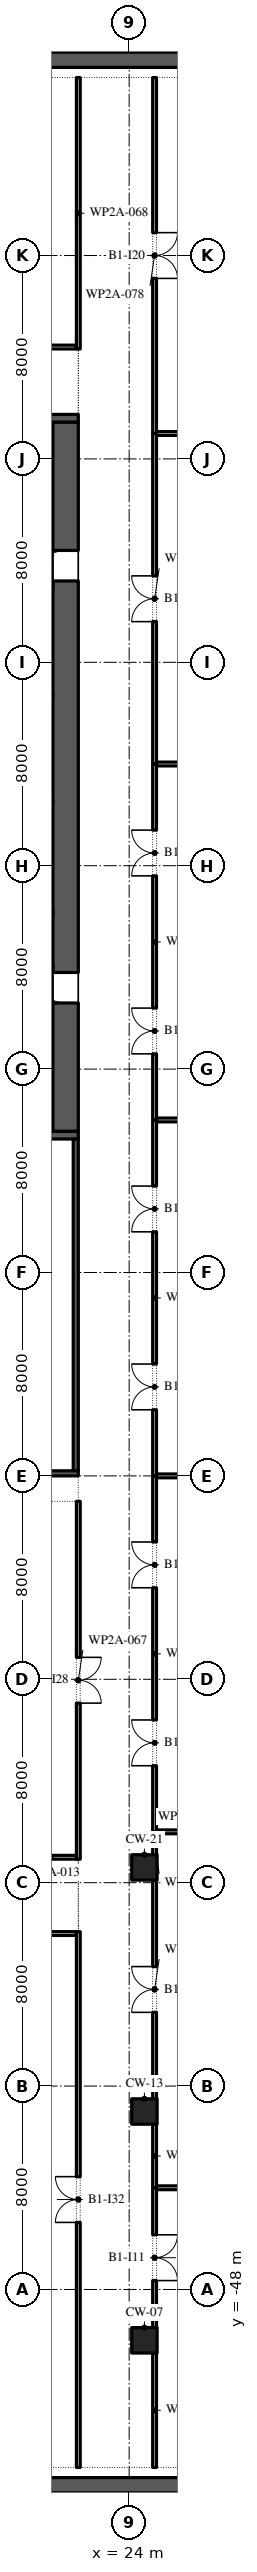
"""IFC4 building model, lengths in metres.
Left out: names, types, materials, properties, quantities, classifications, styles, units other than length and angle.
Written with IfcOpenShell. Run it as: python <this file> out.ifc"""

import sys

from ifc_helpers import new_model, si_unit, direction, frame, frame_2d, origin, origin_2d, place, context, subcontext, project, spatial, rectangle, extrude, element, fill, save


model = new_model("IFC4")
c1 = context("Model", 3, precision=1e-05, world=origin(), true_north=direction((0.0, 1.0)))
c2 = subcontext(c1, "Body", "Model", "MODEL_VIEW")
j1 = project(units=[si_unit("LENGTHUNIT", "METRE"), si_unit("PLANEANGLEUNIT", "RADIAN")], contexts=[c1])
p1 = place(None, origin())
s1 = spatial("IfcSite", under=j1, at=p1, CompositionType="ELEMENT")
p2 = place(p1, origin())
s2 = spatial("IfcBuilding", under=s1, at=p2, CompositionType="ELEMENT")
p3 = place(p2, frame((0.0, 0.0, -5.2)))
s3 = spatial("IfcBuildingStorey", under=s2, at=p3, CompositionType="ELEMENT", Elevation=-5.2)
for number, where, z_axis, x_axis in (
    (1, (-48.0, -55.7, 0.0), (0.0, 0.0, 1.0), (1.0, 0.0, 0.0)),
    (2, (-48.0, 39.7, 0.0), (0.0, 0.0, 1.0), (1.0, 0.0, 0.0)),
):
    element("IfcWall", number, at=place(p3, frame(where, z_axis=z_axis, x_axis=x_axis)), inside=s3, PredefinedType="SOLIDWALL", context=c2, shape_type="SweptSolid", body=[
        extrude(rectangle(XDim=96.0, YDim=0.6, at=frame_2d((48.0, 0.0))), origin(), (0.0, 0.0, 1.0), 4.8),
    ])
for number, where, z_axis, x_axis in (
    (3, (24.6, -50.0, 0.0), (0.0, 0.0, 1.0), (1.0, 0.0, 0.0)),
    (4, (24.6, -41.0, 0.0), (0.0, 0.0, 1.0), (1.0, 0.0, 0.0)),
    (5, (24.6, -31.4, 0.0), (0.0, 0.0, 1.0), (1.0, 0.0, 0.0)),
):
    element("IfcColumn", number, at=place(p3, frame(where, z_axis=z_axis, x_axis=x_axis)), inside=s3, PredefinedType="COLUMN", context=c2, shape_type="SweptSolid", body=[
        extrude(rectangle(XDim=1.0, YDim=1.0, at=origin_2d()), origin(), (0.0, 0.0, 1.0), 5.2),
    ])
p4 = place(p3, frame((21.5, -2.45, 0.0), z_axis=(0.0, 0.0, 1.0), x_axis=(0.0, 1.0, 0.0)))
e6 = element("IfcWall", 6, at=p4, inside=s3, PredefinedType="SHEAR", context=c2, shape_type="SweptSolid", body=[
    extrude(rectangle(XDim=27.9, YDim=1.0, at=frame_2d((13.95, 0.0))), origin(), (0.0, 0.0, 1.0), 4.9),
])
p5 = place(p4, frame((5.05, 0.0, 0.0)))
e7 = element("IfcOpeningElement", 7, at=p5, cuts=e6, PredefinedType="OPENING", context=c2, shape_type="SweptSolid", body=[
    extrude(rectangle(XDim=1.2, YDim=2.1, at=frame_2d((0.6, 1.05))), frame((0.0, 0.51, 0.0), z_axis=(0.0, -1.0, 0.0), x_axis=(1.0, 0.0, 0.0)), (0.0, 0.0, 1.0), 1.02),
])
p6 = place(p4, frame((21.65, 0.0, 0.0)))
e8 = element("IfcOpeningElement", 8, at=p6, cuts=e6, PredefinedType="OPENING", context=c2, shape_type="SweptSolid", body=[
    extrude(rectangle(XDim=1.2, YDim=2.1, at=frame_2d((0.6, 1.05))), frame((0.0, 0.51, 0.0), z_axis=(0.0, -1.0, 0.0), x_axis=(1.0, 0.0, 0.0)), (0.0, 0.0, 1.0), 1.02),
])
for number, where, z_axis, x_axis in (
    (9, (10.0, -2.6, 0.0), (0.0, 0.0, 1.0), (1.0, 0.0, 0.0)),
    (10, (10.0, 25.6, 0.0), (0.0, 0.0, 1.0), (1.0, 0.0, 0.0)),
):
    element("IfcWall", number, at=place(p3, frame(where, z_axis=z_axis, x_axis=x_axis)), inside=s3, PredefinedType="SHEAR", context=c2, shape_type="SweptSolid", body=[
        extrude(rectangle(XDim=12.0, YDim=0.3, at=frame_2d((6.0, 0.0))), origin(), (0.0, 0.0, 1.0), 4.9),
    ])
for number, where, z_axis, x_axis in (
    (11, (17.3, 4.0, 0.0), (0.0, 0.0, 1.0), (1.0, 0.0, 0.0)),
    (12, (17.3, 19.0, 0.0), (0.0, 0.0, 1.0), (1.0, 0.0, 0.0)),
):
    element("IfcWall", number, at=place(p3, frame(where, z_axis=z_axis, x_axis=x_axis)), inside=s3, PredefinedType="SHEAR", context=c2, shape_type="SweptSolid", body=[
        extrude(rectangle(XDim=3.7, YDim=0.3, at=frame_2d((1.85, 0.0))), origin(), (0.0, 0.0, 1.0), 4.9),
    ])
p7 = place(p3, frame((21.9, -15.8, 0.0), z_axis=(0.0, 0.0, 1.0), x_axis=(0.0, 1.0, 0.0)))
e13 = element("IfcWall", 13, at=p7, inside=s3, PredefinedType="SHEAR", context=c2, shape_type="SweptSolid", body=[
    extrude(rectangle(XDim=13.05, YDim=0.2, at=frame_2d((6.525, 0.0))), origin(), (0.0, 0.0, 1.0), 4.9),
])
p8 = place(p3, frame((10.0, -15.9, 0.0), z_axis=(0.0, 0.0, 1.0), x_axis=(1.0, 0.0, 0.0)))
e14 = element("IfcWall", 14, at=p8, inside=s3, PredefinedType="SHEAR", context=c2, shape_type="SweptSolid", body=[
    extrude(rectangle(XDim=12.0, YDim=0.2, at=frame_2d((6.0, 0.0))), origin(), (0.0, 0.0, 1.0), 4.9),
])
p9 = place(p3, frame((25.075, -44.0, 0.0), z_axis=(0.0, 0.0, 1.0), x_axis=(1.0, 0.0, 0.0)))
e15 = element("IfcWall", 15, at=p9, inside=s3, PredefinedType="PARTITIONING", context=c2, shape_type="SweptSolid", body=[
    extrude(rectangle(XDim=9.925, YDim=0.15, at=frame_2d((4.962, 0.0))), origin(), (0.0, 0.0, 1.0), 4.9),
])
p10 = place(p3, frame((11.0, -34.0, 0.0), z_axis=(0.0, 0.0, 1.0), x_axis=(1.0, 0.0, 0.0)))
e16 = element("IfcWall", 16, at=p10, inside=s3, PredefinedType="PARTITIONING", context=c2, shape_type="SweptSolid", body=[
    extrude(rectangle(XDim=10.925, YDim=0.15, at=frame_2d((5.462, 0.0))), origin(), (0.0, 0.0, 1.0), 4.9),
])
p11 = place(p3, frame((19.9, -31.0, 0.0), z_axis=(0.0, 0.0, 1.0), x_axis=(1.0, 0.0, 0.0)))
e17 = element("IfcWall", 17, at=p11, inside=s3, PredefinedType="PARTITIONING", context=c2, shape_type="SweptSolid", body=[
    extrude(rectangle(XDim=2.025, YDim=0.15, at=frame_2d((1.013, 0.0))), origin(), (0.0, 0.0, 1.0), 4.9),
])
p12 = place(p3, frame((25.075, -30.0, 0.0), z_axis=(0.0, 0.0, 1.0), x_axis=(1.0, 0.0, 0.0)))
e18 = element("IfcWall", 18, at=p12, inside=s3, PredefinedType="PARTITIONING", context=c2, shape_type="SweptSolid", body=[
    extrude(rectangle(XDim=3.025, YDim=0.15, at=frame_2d((1.513, 0.0))), origin(), (0.0, 0.0, 1.0), 4.9),
])
p13 = place(p3, frame((25.075, -16.0, 0.0), z_axis=(0.0, 0.0, 1.0), x_axis=(1.0, 0.0, 0.0)))
e19 = element("IfcWall", 19, at=p13, inside=s3, PredefinedType="PARTITIONING", context=c2, shape_type="SweptSolid", body=[
    extrude(rectangle(XDim=16.425, YDim=0.15, at=frame_2d((8.212, 0.0))), origin(), (0.0, 0.0, 1.0), 4.9),
])
p14 = place(p3, frame((25.075, -2.0, 0.0), z_axis=(0.0, 0.0, 1.0), x_axis=(1.0, 0.0, 0.0)))
e20 = element("IfcWall", 20, at=p14, inside=s3, PredefinedType="PARTITIONING", context=c2, shape_type="SweptSolid", body=[
    extrude(rectangle(XDim=21.925, YDim=0.15, at=frame_2d((10.962, 0.0))), origin(), (0.0, 0.0, 1.0), 4.9),
])
p15 = place(p3, frame((25.075, 12.0, 0.0), z_axis=(0.0, 0.0, 1.0), x_axis=(1.0, 0.0, 0.0)))
e21 = element("IfcWall", 21, at=p15, inside=s3, PredefinedType="PARTITIONING", context=c2, shape_type="SweptSolid", body=[
    extrude(rectangle(XDim=6.625, YDim=0.15, at=frame_2d((3.312, 0.0))), origin(), (0.0, 0.0, 1.0), 4.9),
])
p16 = place(p3, frame((25.075, 25.0, 0.0), z_axis=(0.0, 0.0, 1.0), x_axis=(1.0, 0.0, 0.0)))
e22 = element("IfcWall", 22, at=p16, inside=s3, PredefinedType="PARTITIONING", context=c2, shape_type="SweptSolid", body=[
    extrude(rectangle(XDim=21.925, YDim=0.15, at=frame_2d((10.962, 0.0))), origin(), (0.0, 0.0, 1.0), 4.9),
])
p17 = place(p3, frame((0.0, 28.4, 0.0), z_axis=(0.0, 0.0, 1.0), x_axis=(1.0, 0.0, 0.0)))
e23 = element("IfcWall", 23, at=p17, inside=s3, PredefinedType="PARTITIONING", context=c2, shape_type="SweptSolid", body=[
    extrude(rectangle(XDim=21.925, YDim=0.15, at=frame_2d((10.962, 0.0))), origin(), (0.0, 0.0, 1.0), 4.9),
])
p18 = place(p17, frame((10.062, 0.0, 0.0)))
e24 = element("IfcOpeningElement", 24, at=p18, cuts=e23, PredefinedType="OPENING", context=c2, shape_type="SweptSolid", body=[
    extrude(rectangle(XDim=1.8, YDim=2.1, at=frame_2d((0.9, 1.05))), frame((0.0, 0.085, 0.0), z_axis=(0.0, -1.0, 0.0), x_axis=(1.0, 0.0, 0.0)), (0.0, 0.0, 1.0), 0.17),
])
p19 = place(p3, frame((22.0, -55.0, 0.0), z_axis=(0.0, 0.0, 1.0), x_axis=(0.0, 1.0, 0.0)))
e25 = element("IfcWall", 25, at=p19, inside=s3, PredefinedType="PARTITIONING", context=c2, shape_type="SweptSolid", body=[
    extrude(rectangle(XDim=21.075, YDim=0.15, at=frame_2d((10.538, 0.0))), origin(), (0.0, 0.0, 1.0), 4.9),
])
p20 = place(p19, frame((9.637, 0.0, 0.0)))
e26 = element("IfcOpeningElement", 26, at=p20, cuts=e25, PredefinedType="OPENING", context=c2, shape_type="SweptSolid", body=[
    extrude(rectangle(XDim=1.8, YDim=2.1, at=frame_2d((0.9, 1.05))), frame((0.0, 0.085, 0.0), z_axis=(0.0, -1.0, 0.0), x_axis=(1.0, 0.0, 0.0)), (0.0, 0.0, 1.0), 0.17),
])
p21 = place(p3, frame((22.0, -31.075, 0.0), z_axis=(0.0, 0.0, 1.0), x_axis=(0.0, 1.0, 0.0)))
e27 = element("IfcWall", 27, at=p21, inside=s3, PredefinedType="PARTITIONING", context=c2, shape_type="SweptSolid", body=[
    extrude(rectangle(XDim=14.075, YDim=0.15, at=frame_2d((7.038, 0.0))), origin(), (0.0, 0.0, 1.0), 4.9),
])
p22 = place(p21, frame((6.137, 0.0, 0.0)))
e28 = element("IfcOpeningElement", 28, at=p22, cuts=e27, PredefinedType="OPENING", context=c2, shape_type="SweptSolid", body=[
    extrude(rectangle(XDim=1.8, YDim=2.1, at=frame_2d((0.9, 1.05))), frame((0.0, 0.085, 0.0), z_axis=(0.0, -1.0, 0.0), x_axis=(1.0, 0.0, 0.0)), (0.0, 0.0, 1.0), 0.17),
])
p23 = place(p3, frame((22.0, 28.325, 0.0), z_axis=(0.0, 0.0, 1.0), x_axis=(0.0, 1.0, 0.0)))
e29 = element("IfcWall", 29, at=p23, inside=s3, PredefinedType="PARTITIONING", context=c2, shape_type="SweptSolid", body=[
    extrude(rectangle(XDim=10.675, YDim=0.15, at=frame_2d((5.337, 0.0))), origin(), (0.0, 0.0, 1.0), 4.9),
])
p24 = place(p3, frame((25.0, -55.0, 0.0), z_axis=(0.0, 0.0, 1.0), x_axis=(0.0, 1.0, 0.0)))
e30 = element("IfcWall", 30, at=p24, inside=s3, PredefinedType="PARTITIONING", context=c2, shape_type="SweptSolid", body=[
    extrude(rectangle(XDim=4.5, YDim=0.15, at=frame_2d((2.25, 0.0))), origin(), (0.0, 0.0, 1.0), 4.9),
])
p25 = place(p3, frame((25.0, -49.5, 0.0), z_axis=(0.0, 0.0, 1.0), x_axis=(0.0, 1.0, 0.0)))
e31 = element("IfcWall", 31, at=p25, inside=s3, PredefinedType="PARTITIONING", context=c2, shape_type="SweptSolid", body=[
    extrude(rectangle(XDim=5.5, YDim=0.15, at=frame_2d((2.75, 0.0))), origin(), (0.0, 0.0, 1.0), 4.9),
])
p26 = place(p25, frame((1.85, 0.0, 0.0)))
e32 = element("IfcOpeningElement", 32, at=p26, cuts=e31, PredefinedType="OPENING", context=c2, shape_type="SweptSolid", body=[
    extrude(rectangle(XDim=1.8, YDim=2.1, at=frame_2d((0.9, 1.05))), frame((0.0, 0.085, 0.0), z_axis=(0.0, -1.0, 0.0), x_axis=(1.0, 0.0, 0.0)), (0.0, 0.0, 1.0), 0.17),
])
p27 = place(p3, frame((25.0, -44.0, 0.0), z_axis=(0.0, 0.0, 1.0), x_axis=(0.0, 1.0, 0.0)))
e33 = element("IfcWall", 33, at=p27, inside=s3, PredefinedType="PARTITIONING", context=c2, shape_type="SweptSolid", body=[
    extrude(rectangle(XDim=2.5, YDim=0.15, at=frame_2d((1.25, 0.0))), origin(), (0.0, 0.0, 1.0), 4.9),
])
p28 = place(p3, frame((25.0, -40.5, 0.0), z_axis=(0.0, 0.0, 1.0), x_axis=(0.0, 1.0, 0.0)))
e34 = element("IfcWall", 34, at=p28, inside=s3, PredefinedType="PARTITIONING", context=c2, shape_type="SweptSolid", body=[
    extrude(rectangle(XDim=8.6, YDim=0.15, at=frame_2d((4.3, 0.0))), origin(), (0.0, 0.0, 1.0), 4.9),
])
p29 = place(p28, frame((3.4, 0.0, 0.0)))
e35 = element("IfcOpeningElement", 35, at=p29, cuts=e34, PredefinedType="OPENING", context=c2, shape_type="SweptSolid", body=[
    extrude(rectangle(XDim=1.8, YDim=2.1, at=frame_2d((0.9, 1.05))), frame((0.0, 0.085, 0.0), z_axis=(0.0, -1.0, 0.0), x_axis=(1.0, 0.0, 0.0)), (0.0, 0.0, 1.0), 0.17),
])
p30 = place(p3, frame((25.0, -30.9, 0.0), z_axis=(0.0, 0.0, 1.0), x_axis=(0.0, 1.0, 0.0)))
e36 = element("IfcWall", 36, at=p30, inside=s3, PredefinedType="PARTITIONING", context=c2, shape_type="SweptSolid", body=[
    extrude(rectangle(XDim=0.9, YDim=0.15, at=frame_2d((0.45, 0.0))), origin(), (0.0, 0.0, 1.0), 4.9),
])
p31 = place(p3, frame((25.0, -30.0, 0.0), z_axis=(0.0, 0.0, 1.0), x_axis=(0.0, 1.0, 0.0)))
e37 = element("IfcWall", 37, at=p31, inside=s3, PredefinedType="PARTITIONING", context=c2, shape_type="SweptSolid", body=[
    extrude(rectangle(XDim=14.0, YDim=0.15, at=frame_2d((7.0, 0.0))), origin(), (0.0, 0.0, 1.0), 4.9),
])
p32 = place(p31, frame((2.6, 0.0, 0.0)))
e38 = element("IfcOpeningElement", 38, at=p32, cuts=e37, PredefinedType="OPENING", context=c2, shape_type="SweptSolid", body=[
    extrude(rectangle(XDim=1.8, YDim=2.1, at=frame_2d((0.9, 1.05))), frame((0.0, 0.085, 0.0), z_axis=(0.0, -1.0, 0.0), x_axis=(1.0, 0.0, 0.0)), (0.0, 0.0, 1.0), 0.17),
])
p33 = place(p31, frame((9.6, 0.0, 0.0)))
e39 = element("IfcOpeningElement", 39, at=p33, cuts=e37, PredefinedType="OPENING", context=c2, shape_type="SweptSolid", body=[
    extrude(rectangle(XDim=1.8, YDim=2.1, at=frame_2d((0.9, 1.05))), frame((0.0, 0.085, 0.0), z_axis=(0.0, -1.0, 0.0), x_axis=(1.0, 0.0, 0.0)), (0.0, 0.0, 1.0), 0.17),
])
p34 = place(p3, frame((25.0, -16.0, 0.0), z_axis=(0.0, 0.0, 1.0), x_axis=(0.0, 1.0, 0.0)))
e40 = element("IfcWall", 40, at=p34, inside=s3, PredefinedType="PARTITIONING", context=c2, shape_type="SweptSolid", body=[
    extrude(rectangle(XDim=14.0, YDim=0.15, at=frame_2d((7.0, 0.0))), origin(), (0.0, 0.0, 1.0), 4.9),
])
p35 = place(p34, frame((2.6, 0.0, 0.0)))
e41 = element("IfcOpeningElement", 41, at=p35, cuts=e40, PredefinedType="OPENING", context=c2, shape_type="SweptSolid", body=[
    extrude(rectangle(XDim=1.8, YDim=2.1, at=frame_2d((0.9, 1.05))), frame((0.0, 0.085, 0.0), z_axis=(0.0, -1.0, 0.0), x_axis=(1.0, 0.0, 0.0)), (0.0, 0.0, 1.0), 0.17),
])
p36 = place(p34, frame((9.6, 0.0, 0.0)))
e42 = element("IfcOpeningElement", 42, at=p36, cuts=e40, PredefinedType="OPENING", context=c2, shape_type="SweptSolid", body=[
    extrude(rectangle(XDim=1.8, YDim=2.1, at=frame_2d((0.9, 1.05))), frame((0.0, 0.085, 0.0), z_axis=(0.0, -1.0, 0.0), x_axis=(1.0, 0.0, 0.0)), (0.0, 0.0, 1.0), 0.17),
])
p37 = place(p3, frame((25.0, -2.0, 0.0), z_axis=(0.0, 0.0, 1.0), x_axis=(0.0, 1.0, 0.0)))
e43 = element("IfcWall", 43, at=p37, inside=s3, PredefinedType="PARTITIONING", context=c2, shape_type="SweptSolid", body=[
    extrude(rectangle(XDim=14.0, YDim=0.15, at=frame_2d((7.0, 0.0))), origin(), (0.0, 0.0, 1.0), 4.9),
])
p38 = place(p37, frame((2.6, 0.0, 0.0)))
e44 = element("IfcOpeningElement", 44, at=p38, cuts=e43, PredefinedType="OPENING", context=c2, shape_type="SweptSolid", body=[
    extrude(rectangle(XDim=1.8, YDim=2.1, at=frame_2d((0.9, 1.05))), frame((0.0, 0.085, 0.0), z_axis=(0.0, -1.0, 0.0), x_axis=(1.0, 0.0, 0.0)), (0.0, 0.0, 1.0), 0.17),
])
p39 = place(p37, frame((9.6, 0.0, 0.0)))
e45 = element("IfcOpeningElement", 45, at=p39, cuts=e43, PredefinedType="OPENING", context=c2, shape_type="SweptSolid", body=[
    extrude(rectangle(XDim=1.8, YDim=2.1, at=frame_2d((0.9, 1.05))), frame((0.0, 0.085, 0.0), z_axis=(0.0, -1.0, 0.0), x_axis=(1.0, 0.0, 0.0)), (0.0, 0.0, 1.0), 0.17),
])
p40 = place(p3, frame((25.0, 12.0, 0.0), z_axis=(0.0, 0.0, 1.0), x_axis=(0.0, 1.0, 0.0)))
e46 = element("IfcWall", 46, at=p40, inside=s3, PredefinedType="PARTITIONING", context=c2, shape_type="SweptSolid", body=[
    extrude(rectangle(XDim=13.0, YDim=0.15, at=frame_2d((6.5, 0.0))), origin(), (0.0, 0.0, 1.0), 4.9),
])
p41 = place(p40, frame((5.6, 0.0, 0.0)))
e47 = element("IfcOpeningElement", 47, at=p41, cuts=e46, PredefinedType="OPENING", context=c2, shape_type="SweptSolid", body=[
    extrude(rectangle(XDim=1.8, YDim=2.1, at=frame_2d((0.9, 1.05))), frame((0.0, 0.085, 0.0), z_axis=(0.0, -1.0, 0.0), x_axis=(1.0, 0.0, 0.0)), (0.0, 0.0, 1.0), 0.17),
])
p42 = place(p3, frame((25.0, 25.0, 0.0), z_axis=(0.0, 0.0, 1.0), x_axis=(0.0, 1.0, 0.0)))
e48 = element("IfcWall", 48, at=p42, inside=s3, PredefinedType="PARTITIONING", context=c2, shape_type="SweptSolid", body=[
    extrude(rectangle(XDim=14.0, YDim=0.15, at=frame_2d((7.0, 0.0))), origin(), (0.0, 0.0, 1.0), 4.9),
])
p43 = place(p42, frame((6.1, 0.0, 0.0)))
e49 = element("IfcOpeningElement", 49, at=p43, cuts=e48, PredefinedType="OPENING", context=c2, shape_type="SweptSolid", body=[
    extrude(rectangle(XDim=1.8, YDim=2.1, at=frame_2d((0.9, 1.05))), frame((0.0, 0.085, 0.0), z_axis=(0.0, -1.0, 0.0), x_axis=(1.0, 0.0, 0.0)), (0.0, 0.0, 1.0), 0.17),
])
p44 = place(p5, origin())
e50 = element("IfcDoor", 50, at=p44, inside=s3, OperationType="SINGLE_SWING_LEFT", PredefinedType="DOOR", context=c2, shape_type="SweptSolid", body=[
    extrude(rectangle(XDim=1.2, YDim=2.1, at=frame_2d((0.6, 1.05))), frame((0.0, 0.025, 0.0), z_axis=(0.0, -1.0, 0.0), x_axis=(1.0, 0.0, 0.0)), (0.0, 0.0, 1.0), 0.05),
])
fill(e7, e50)
p45 = place(p6, origin())
e51 = element("IfcDoor", 51, at=p45, inside=s3, OperationType="SINGLE_SWING_RIGHT", PredefinedType="DOOR", context=c2, shape_type="SweptSolid", body=[
    extrude(rectangle(XDim=1.2, YDim=2.1, at=frame_2d((0.6, 1.05))), frame((0.0, 0.025, 0.0), z_axis=(0.0, -1.0, 0.0), x_axis=(1.0, 0.0, 0.0)), (0.0, 0.0, 1.0), 0.05),
])
fill(e8, e51)
p46 = place(p26, frame((1.8, 0.0, 0.0), z_axis=(0.0, 0.0, 1.0), x_axis=(-1.0, 0.0, 0.0)))
e52 = element("IfcDoor", 52, at=p46, inside=s3, OperationType="SINGLE_SWING_RIGHT", PredefinedType="DOOR", context=c2, shape_type="SweptSolid", body=[
    extrude(rectangle(XDim=1.8, YDim=2.1, at=frame_2d((0.9, 1.05))), frame((0.0, 0.025, 0.0), z_axis=(0.0, -1.0, 0.0), x_axis=(1.0, 0.0, 0.0)), (0.0, 0.0, 1.0), 0.05),
])
fill(e32, e52)
p47 = place(p29, origin())
e53 = element("IfcDoor", 53, at=p47, inside=s3, OperationType="SINGLE_SWING_RIGHT", PredefinedType="DOOR", context=c2, shape_type="SweptSolid", body=[
    extrude(rectangle(XDim=1.8, YDim=2.1, at=frame_2d((0.9, 1.05))), frame((0.0, 0.025, 0.0), z_axis=(0.0, -1.0, 0.0), x_axis=(1.0, 0.0, 0.0)), (0.0, 0.0, 1.0), 0.05),
])
fill(e35, e53)
p48 = place(p32, origin())
e54 = element("IfcDoor", 54, at=p48, inside=s3, OperationType="SINGLE_SWING_RIGHT", PredefinedType="DOOR", context=c2, shape_type="SweptSolid", body=[
    extrude(rectangle(XDim=1.8, YDim=2.1, at=frame_2d((0.9, 1.05))), frame((0.0, 0.025, 0.0), z_axis=(0.0, -1.0, 0.0), x_axis=(1.0, 0.0, 0.0)), (0.0, 0.0, 1.0), 0.05),
])
fill(e38, e54)
p49 = place(p33, origin())
e55 = element("IfcDoor", 55, at=p49, inside=s3, OperationType="SINGLE_SWING_LEFT", PredefinedType="DOOR", context=c2, shape_type="SweptSolid", body=[
    extrude(rectangle(XDim=1.8, YDim=2.1, at=frame_2d((0.9, 1.05))), frame((0.0, 0.025, 0.0), z_axis=(0.0, -1.0, 0.0), x_axis=(1.0, 0.0, 0.0)), (0.0, 0.0, 1.0), 0.05),
])
fill(e39, e55)
p50 = place(p35, origin())
e56 = element("IfcDoor", 56, at=p50, inside=s3, OperationType="SINGLE_SWING_LEFT", PredefinedType="DOOR", context=c2, shape_type="SweptSolid", body=[
    extrude(rectangle(XDim=1.8, YDim=2.1, at=frame_2d((0.9, 1.05))), frame((0.0, 0.025, 0.0), z_axis=(0.0, -1.0, 0.0), x_axis=(1.0, 0.0, 0.0)), (0.0, 0.0, 1.0), 0.05),
])
fill(e41, e56)
p51 = place(p36, origin())
e57 = element("IfcDoor", 57, at=p51, inside=s3, OperationType="SINGLE_SWING_LEFT", PredefinedType="DOOR", context=c2, shape_type="SweptSolid", body=[
    extrude(rectangle(XDim=1.8, YDim=2.1, at=frame_2d((0.9, 1.05))), frame((0.0, 0.025, 0.0), z_axis=(0.0, -1.0, 0.0), x_axis=(1.0, 0.0, 0.0)), (0.0, 0.0, 1.0), 0.05),
])
fill(e42, e57)
p52 = place(p38, origin())
e58 = element("IfcDoor", 58, at=p52, inside=s3, OperationType="SINGLE_SWING_LEFT", PredefinedType="DOOR", context=c2, shape_type="SweptSolid", body=[
    extrude(rectangle(XDim=1.8, YDim=2.1, at=frame_2d((0.9, 1.05))), frame((0.0, 0.025, 0.0), z_axis=(0.0, -1.0, 0.0), x_axis=(1.0, 0.0, 0.0)), (0.0, 0.0, 1.0), 0.05),
])
fill(e44, e58)
p53 = place(p39, origin())
e59 = element("IfcDoor", 59, at=p53, inside=s3, OperationType="SINGLE_SWING_RIGHT", PredefinedType="DOOR", context=c2, shape_type="SweptSolid", body=[
    extrude(rectangle(XDim=1.8, YDim=2.1, at=frame_2d((0.9, 1.05))), frame((0.0, 0.025, 0.0), z_axis=(0.0, -1.0, 0.0), x_axis=(1.0, 0.0, 0.0)), (0.0, 0.0, 1.0), 0.05),
])
fill(e45, e59)
p54 = place(p41, origin())
e60 = element("IfcDoor", 60, at=p54, inside=s3, OperationType="SINGLE_SWING_RIGHT", PredefinedType="DOOR", context=c2, shape_type="SweptSolid", body=[
    extrude(rectangle(XDim=1.8, YDim=2.1, at=frame_2d((0.9, 1.05))), frame((0.0, 0.025, 0.0), z_axis=(0.0, -1.0, 0.0), x_axis=(1.0, 0.0, 0.0)), (0.0, 0.0, 1.0), 0.05),
])
fill(e47, e60)
p55 = place(p43, frame((1.8, 0.0, 0.0), z_axis=(0.0, 0.0, 1.0), x_axis=(-1.0, 0.0, 0.0)))
e61 = element("IfcDoor", 61, at=p55, inside=s3, OperationType="SINGLE_SWING_RIGHT", PredefinedType="DOOR", context=c2, shape_type="SweptSolid", body=[
    extrude(rectangle(XDim=1.8, YDim=2.1, at=frame_2d((0.9, 1.05))), frame((0.0, 0.025, 0.0), z_axis=(0.0, -1.0, 0.0), x_axis=(1.0, 0.0, 0.0)), (0.0, 0.0, 1.0), 0.05),
])
fill(e49, e61)
p56 = place(p22, frame((1.8, 0.0, 0.0), z_axis=(0.0, 0.0, 1.0), x_axis=(-1.0, 0.0, 0.0)))
e62 = element("IfcDoor", 62, at=p56, inside=s3, OperationType="SINGLE_SWING_RIGHT", PredefinedType="DOOR", context=c2, shape_type="SweptSolid", body=[
    extrude(rectangle(XDim=1.8, YDim=2.1, at=frame_2d((0.9, 1.05))), frame((0.0, 0.025, 0.0), z_axis=(0.0, -1.0, 0.0), x_axis=(1.0, 0.0, 0.0)), (0.0, 0.0, 1.0), 0.05),
])
fill(e28, e62)
p57 = place(p20, origin())
e63 = element("IfcDoor", 63, at=p57, inside=s3, OperationType="SINGLE_SWING_RIGHT", PredefinedType="DOOR", context=c2, shape_type="SweptSolid", body=[
    extrude(rectangle(XDim=1.8, YDim=2.1, at=frame_2d((0.9, 1.05))), frame((0.0, 0.025, 0.0), z_axis=(0.0, -1.0, 0.0), x_axis=(1.0, 0.0, 0.0)), (0.0, 0.0, 1.0), 0.05),
])
fill(e26, e63)
save(model, sys.argv[1])
